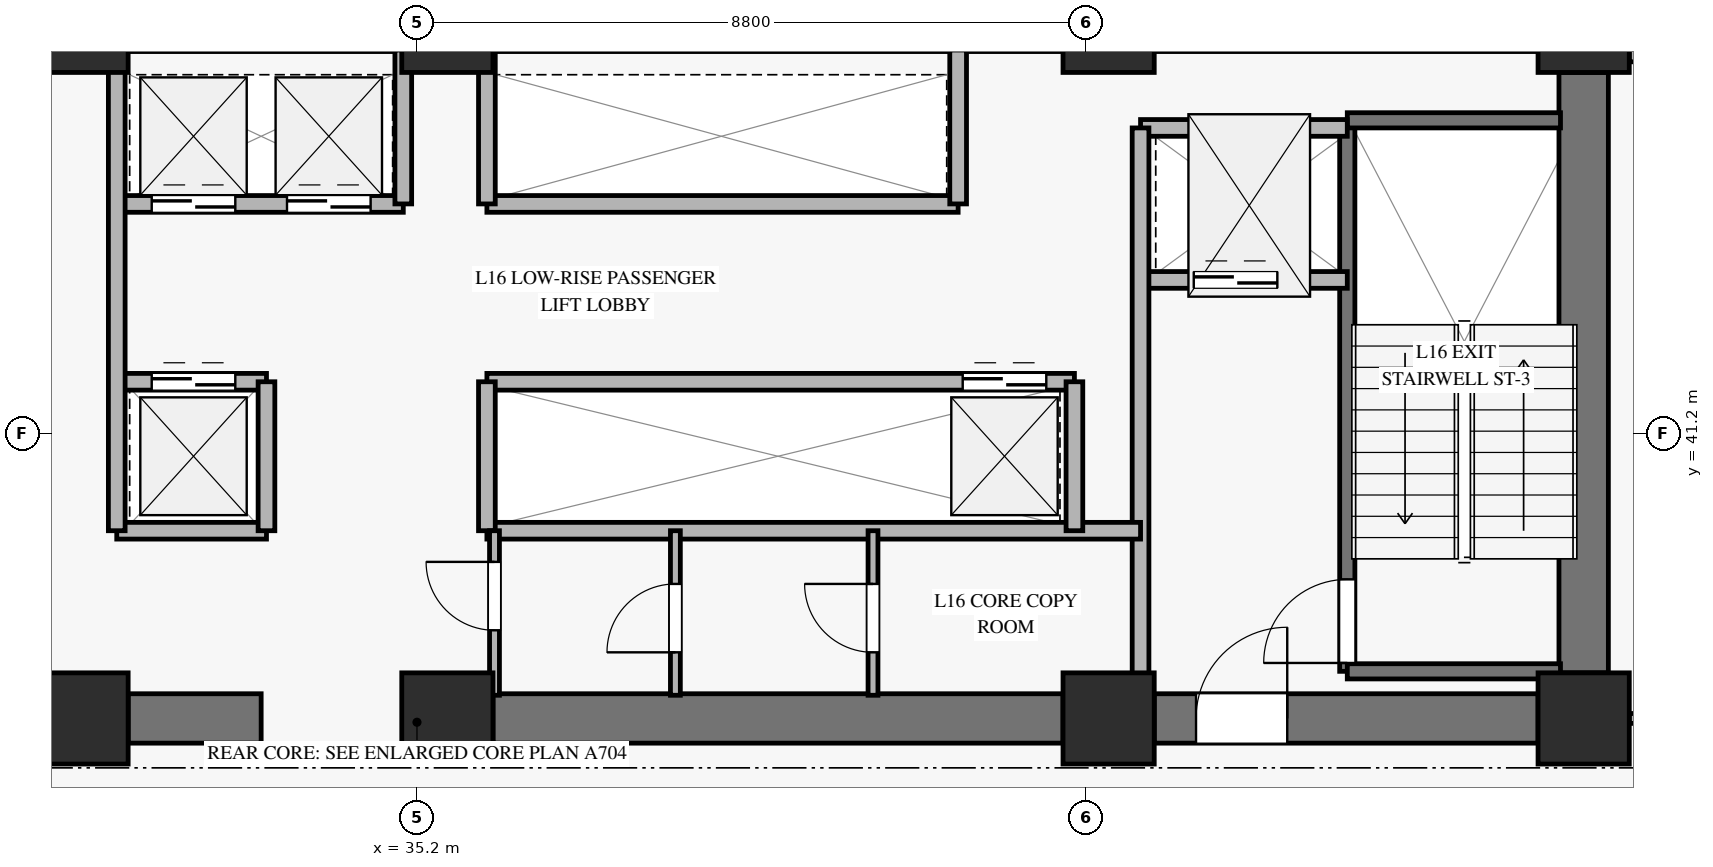
"""IFC4 building model, lengths in metres.
Left out: names, types, materials, properties, quantities, classifications, styles, units other than length and angle.
Written with IfcOpenShell. Run it as: python <this file> out.ifc"""

import sys

from ifc_helpers import new_model, si_unit, direction, frame, frame_2d, origin, origin_2d, place, context, subcontext, project, spatial, rectangle, extrude, source, transform, mapped, element, fill, save


model = new_model("IFC4")
c1 = context("Model", 3, precision=1e-05, world=origin(), true_north=direction((0.0, 1.0)))
c2 = subcontext(c1, "Body", "Model", "MODEL_VIEW")
j1 = project(units=[si_unit("LENGTHUNIT", "METRE"), si_unit("PLANEANGLEUNIT", "RADIAN")], contexts=[c1])
p1 = place(None, origin())
s1 = spatial("IfcSite", under=j1, at=p1, CompositionType="ELEMENT")
p2 = place(p1, origin())
s2 = spatial("IfcBuilding", under=s1, at=p2, CompositionType="ELEMENT")
p3 = place(p2, frame((0.0, 0.0, 65.0)))
s3 = spatial("IfcBuildingStorey", under=s2, at=p3, CompositionType="ELEMENT", Elevation=65.0)
m1 = source(origin(), c2, "Body", "SweptSolid", [
    extrude(rectangle(XDim=1.2, YDim=1.2, at=origin_2d()), origin(), (0.0, 0.0, 1.0), 3.68),
])
for number, where, z_axis, x_axis in (
    (1, (30.8, 37.45, 0.0), (0.0, 0.0, 1.0), (1.0, 0.0, 0.0)),
    (2, (30.8, 46.55, 0.0), (0.0, 0.0, 1.0), (1.0, 0.0, 0.0)),
    (3, (35.6, 37.45, 0.0), (0.0, 0.0, 1.0), (1.0, 0.0, 0.0)),
    (4, (35.6, 46.55, 0.0), (0.0, 0.0, 1.0), (1.0, 0.0, 0.0)),
    (5, (44.3, 37.45, 0.0), (0.0, 0.0, 1.0), (1.0, 0.0, 0.0)),
    (6, (44.3, 46.55, 0.0), (0.0, 0.0, 1.0), (1.0, 0.0, 0.0)),
    (7, (50.55, 37.45, 0.0), (0.0, 0.0, 1.0), (1.0, 0.0, 0.0)),
    (8, (50.55, 46.55, 0.0), (0.0, 0.0, 1.0), (1.0, 0.0, 0.0)),
):
    element("IfcColumn", number, at=place(p3, frame(where, z_axis=z_axis, x_axis=x_axis)), inside=s3, PredefinedType="PILASTER", context=c2, shape_type="MappedRepresentation", body=[
        mapped(m1, transform((0.0, 0.0, 0.0), x_axis=(1.0, 0.0, 0.0), y_axis=(0.0, 1.0, 0.0), z_axis=(0.0, 0.0, 1.0), scale=1.0)),
    ])
p4 = place(p3, frame((31.4, 37.45, 0.0), z_axis=(0.0, 0.0, 1.0), x_axis=(1.0, 0.0, 0.0)))
e9 = element("IfcWall", 9, at=p4, inside=s3, PredefinedType="SHEAR", context=c2, shape_type="SweptSolid", body=[
    extrude(rectangle(XDim=1.75, YDim=0.65, at=frame_2d((0.875, 0.0))), origin(), (0.0, 0.0, 1.0), 3.68),
])
p5 = place(p3, frame((36.2, 37.45, 0.0), z_axis=(0.0, 0.0, 1.0), x_axis=(1.0, 0.0, 0.0)))
e10 = element("IfcWall", 10, at=p5, inside=s3, PredefinedType="SHEAR", context=c2, shape_type="SweptSolid", body=[
    extrude(rectangle(XDim=7.5, YDim=0.65, at=frame_2d((3.75, 0.0))), origin(), (0.0, 0.0, 1.0), 3.68),
])
p6 = place(p3, frame((44.9, 37.45, 0.0), z_axis=(0.0, 0.0, 1.0), x_axis=(1.0, 0.0, 0.0)))
e11 = element("IfcWall", 11, at=p6, inside=s3, PredefinedType="SHEAR", context=c2, shape_type="SweptSolid", body=[
    extrude(rectangle(XDim=5.05, YDim=0.65, at=frame_2d((2.525, 0.0))), origin(), (0.0, 0.0, 1.0), 3.68),
])
p7 = place(p6, frame((0.55, 0.0, 0.0)))
e12 = element("IfcOpeningElement", 12, at=p7, cuts=e11, PredefinedType="OPENING", context=c2, shape_type="SweptSolid", body=[
    extrude(rectangle(XDim=1.2, YDim=2.15, at=frame_2d((0.6, 1.075))), frame((0.0, 0.335, 0.0), z_axis=(0.0, -1.0, 0.0), x_axis=(1.0, 0.0, 0.0)), (0.0, 0.0, 1.0), 0.67),
])
p8 = place(p3, frame((50.55, 38.05, 0.0), z_axis=(0.0, 0.0, 1.0), x_axis=(0.0, 1.0, 0.0)))
e13 = element("IfcWall", 13, at=p8, inside=s3, PredefinedType="SHEAR", context=c2, shape_type="SweptSolid", body=[
    extrude(rectangle(XDim=7.9, YDim=0.65, at=frame_2d((3.95, 0.0))), origin(), (0.0, 0.0, 1.0), 3.68),
])
p9 = place(p3, frame((51.15, 46.25, 0.0), z_axis=(0.0, 0.0, 1.0), x_axis=(1.0, 0.0, 0.0)))
e14 = element("IfcWall", 14, at=p9, inside=s3, PredefinedType="SOLIDWALL", context=c2, shape_type="SweptSolid", body=[
    extrude(rectangle(XDim=11.824, YDim=0.32, at=frame_2d((5.912, 0.0))), origin(), (0.0, 0.0, 1.0), 3.16),
])
p10 = place(p9, frame((5.112, 0.0, 0.45)))
e15 = element("IfcOpeningElement", 15, at=p10, cuts=e14, PredefinedType="OPENING", context=c2, shape_type="SweptSolid", body=[
    extrude(rectangle(XDim=1.6, YDim=2.0, at=frame_2d((0.8, 1.0))), frame((0.0, 0.17, 0.0), z_axis=(0.0, -1.0, 0.0), x_axis=(1.0, 0.0, 0.0)), (0.0, 0.0, 1.0), 0.34),
])
p11 = place(p3, frame((47.44, 38.07, 0.0), z_axis=(0.0, 0.0, 1.0), x_axis=(0.0, 1.0, 0.0)))
e16 = element("IfcWall", 16, at=p11, inside=s3, PredefinedType="SOLIDWALL", context=c2, shape_type="SweptSolid", body=[
    extrude(rectangle(XDim=7.25, YDim=0.2, at=frame_2d((3.625, 0.0))), origin(), (0.0, 0.0, 1.0), 3.9),
])
p12 = place(p11, frame((0.11, 0.0, 0.0)))
e17 = element("IfcOpeningElement", 17, at=p12, cuts=e16, PredefinedType="OPENING", context=c2, shape_type="SweptSolid", body=[
    extrude(rectangle(XDim=1.1, YDim=2.15, at=frame_2d((0.55, 1.075))), frame((0.0, 0.11, 0.0), z_axis=(0.0, -1.0, 0.0), x_axis=(1.0, 0.0, 0.0)), (0.0, 0.0, 1.0), 0.22),
])
for number, where, z_axis, x_axis in (
    (18, (47.44, 45.32, 0.0), (0.0, 0.0, 1.0), (1.0, 0.0, 0.0)),
    (19, (47.44, 38.07, 0.0), (0.0, 0.0, 1.0), (1.0, 0.0, 0.0)),
):
    element("IfcWall", number, at=place(p3, frame(where, z_axis=z_axis, x_axis=x_axis)), inside=s3, PredefinedType="SOLIDWALL", context=c2, shape_type="SweptSolid", body=[
        extrude(rectangle(XDim=2.805, YDim=0.2, at=frame_2d((1.403, 0.0))), origin(), (0.0, 0.0, 1.0), 3.9),
    ])
p13 = place(p3, frame((44.72, 43.22, 0.0), z_axis=(0.0, 0.0, 1.0), x_axis=(1.0, 0.0, 0.0)))
e20 = element("IfcWall", 20, at=p13, inside=s3, PredefinedType="SOLIDWALL", context=c2, shape_type="SweptSolid", body=[
    extrude(rectangle(XDim=2.72, YDim=0.22, at=frame_2d((1.36, 0.0))), origin(), (0.0, 0.0, 1.0), 3.68),
])
p14 = place(p13, frame((0.7, 0.0, 0.0)))
e21 = element("IfcOpeningElement", 21, at=p14, cuts=e20, PredefinedType="OPENING", context=c2, shape_type="SweptSolid", body=[
    extrude(rectangle(XDim=1.1, YDim=2.2, at=frame_2d((0.55, 1.1))), frame((0.0, 0.12, 0.0), z_axis=(0.0, -1.0, 0.0), x_axis=(1.0, 0.0, 0.0)), (0.0, 0.0, 1.0), 0.24),
])
p15 = place(p3, frame((44.72, 45.22, 0.0), z_axis=(0.0, 0.0, 1.0), x_axis=(1.0, 0.0, 0.0)))
e22 = element("IfcWall", 22, at=p15, inside=s3, PredefinedType="SOLIDWALL", context=c2, shape_type="SweptSolid", body=[
    extrude(rectangle(XDim=2.72, YDim=0.22, at=frame_2d((1.36, 0.0))), origin(), (0.0, 0.0, 1.0), 3.68),
])
p16 = place(p3, frame((44.72, 37.755, 0.0), z_axis=(0.0, 0.0, 1.0), x_axis=(0.0, 1.0, 0.0)))
e23 = element("IfcWall", 23, at=p16, inside=s3, PredefinedType="SOLIDWALL", context=c2, shape_type="SweptSolid", body=[
    extrude(rectangle(XDim=7.465, YDim=0.22, at=frame_2d((3.732, 0.0))), origin(), (0.0, 0.0, 1.0), 3.68),
])
p17 = place(p3, frame((31.25, 44.22, 0.0), z_axis=(0.0, 0.0, 1.0), x_axis=(1.0, 0.0, 0.0)))
e24 = element("IfcWall", 24, at=p17, inside=s3, PredefinedType="SOLIDWALL", context=c2, shape_type="SweptSolid", body=[
    extrude(rectangle(XDim=3.77, YDim=0.22, at=frame_2d((1.885, 0.0))), origin(), (0.0, 0.0, 1.0), 3.68),
])
p18 = place(p17, frame((0.46, 0.0, 0.0)))
e25 = element("IfcOpeningElement", 25, at=p18, cuts=e24, PredefinedType="OPENING", context=c2, shape_type="SweptSolid", body=[
    extrude(rectangle(XDim=1.1, YDim=2.2, at=frame_2d((0.55, 1.1))), frame((0.0, 0.12, 0.0), z_axis=(0.0, -1.0, 0.0), x_axis=(1.0, 0.0, 0.0)), (0.0, 0.0, 1.0), 0.24),
])
p19 = place(p17, frame((2.24, 0.0, 0.0)))
e26 = element("IfcOpeningElement", 26, at=p19, cuts=e24, PredefinedType="OPENING", context=c2, shape_type="SweptSolid", body=[
    extrude(rectangle(XDim=1.1, YDim=2.2, at=frame_2d((0.55, 1.1))), frame((0.0, 0.12, 0.0), z_axis=(0.0, -1.0, 0.0), x_axis=(1.0, 0.0, 0.0)), (0.0, 0.0, 1.0), 0.24),
])
p20 = place(p3, frame((36.12, 44.22, 0.0), z_axis=(0.0, 0.0, 1.0), x_axis=(1.0, 0.0, 0.0)))
e27 = element("IfcWall", 27, at=p20, inside=s3, PredefinedType="SOLIDWALL", context=c2, shape_type="SweptSolid", body=[
    extrude(rectangle(XDim=6.2, YDim=0.22, at=frame_2d((3.1, 0.0))), origin(), (0.0, 0.0, 1.0), 3.68),
])
for number, where, z_axis, x_axis in (
    (28, (35.02, 44.22, 0.0), (0.0, 0.0, 1.0), (0.0, 1.0, 0.0)),
    (29, (36.12, 44.22, 0.0), (0.0, 0.0, 1.0), (0.0, 1.0, 0.0)),
    (30, (42.32, 44.22, 0.0), (0.0, 0.0, 1.0), (0.0, 1.0, 0.0)),
):
    element("IfcWall", number, at=place(p3, frame(where, z_axis=z_axis, x_axis=x_axis)), inside=s3, PredefinedType="SOLIDWALL", context=c2, shape_type="SweptSolid", body=[
        extrude(rectangle(XDim=2.025, YDim=0.22, at=frame_2d((1.013, 0.0))), origin(), (0.0, 0.0, 1.0), 3.68),
    ])
p21 = place(p3, frame((31.25, 41.88, 0.0), z_axis=(0.0, 0.0, 1.0), x_axis=(1.0, 0.0, 0.0)))
e31 = element("IfcWall", 31, at=p21, inside=s3, PredefinedType="SOLIDWALL", context=c2, shape_type="SweptSolid", body=[
    extrude(rectangle(XDim=1.97, YDim=0.22, at=frame_2d((0.985, 0.0))), origin(), (0.0, 0.0, 1.0), 3.68),
])
p22 = place(p21, frame((0.46, 0.0, 0.0)))
e32 = element("IfcOpeningElement", 32, at=p22, cuts=e31, PredefinedType="OPENING", context=c2, shape_type="SweptSolid", body=[
    extrude(rectangle(XDim=1.1, YDim=2.2, at=frame_2d((0.55, 1.1))), frame((0.0, 0.12, 0.0), z_axis=(0.0, -1.0, 0.0), x_axis=(1.0, 0.0, 0.0)), (0.0, 0.0, 1.0), 0.24),
])
p23 = place(p3, frame((36.12, 41.88, 0.0), z_axis=(0.0, 0.0, 1.0), x_axis=(1.0, 0.0, 0.0)))
e33 = element("IfcWall", 33, at=p23, inside=s3, PredefinedType="SOLIDWALL", context=c2, shape_type="SweptSolid", body=[
    extrude(rectangle(XDim=7.73, YDim=0.22, at=frame_2d((3.865, 0.0))), origin(), (0.0, 0.0, 1.0), 3.68),
])
p24 = place(p23, frame((6.26, 0.0, 0.0)))
e34 = element("IfcOpeningElement", 34, at=p24, cuts=e33, PredefinedType="OPENING", context=c2, shape_type="SweptSolid", body=[
    extrude(rectangle(XDim=1.1, YDim=2.2, at=frame_2d((0.55, 1.1))), frame((0.0, 0.12, 0.0), z_axis=(0.0, -1.0, 0.0), x_axis=(1.0, 0.0, 0.0)), (0.0, 0.0, 1.0), 0.24),
])
p25 = place(p3, frame((31.25, 39.92, 0.0), z_axis=(0.0, 0.0, 1.0), x_axis=(1.0, 0.0, 0.0)))
e35 = element("IfcWall", 35, at=p25, inside=s3, PredefinedType="SOLIDWALL", context=c2, shape_type="SweptSolid", body=[
    extrude(rectangle(XDim=1.97, YDim=0.22, at=frame_2d((0.985, 0.0))), origin(), (0.0, 0.0, 1.0), 3.68),
])
p26 = place(p3, frame((33.22, 39.92, 0.0), z_axis=(0.0, 0.0, 1.0), x_axis=(0.0, 1.0, 0.0)))
e36 = element("IfcWall", 36, at=p26, inside=s3, PredefinedType="SOLIDWALL", context=c2, shape_type="SweptSolid", body=[
    extrude(rectangle(XDim=1.96, YDim=0.22, at=frame_2d((0.98, 0.0))), origin(), (0.0, 0.0, 1.0), 3.68),
])
p27 = place(p3, frame((36.12, 39.92, 0.0), z_axis=(0.0, 0.0, 1.0), x_axis=(1.0, 0.0, 0.0)))
e37 = element("IfcWall", 37, at=p27, inside=s3, PredefinedType="SOLIDWALL", context=c2, shape_type="SweptSolid", body=[
    extrude(rectangle(XDim=8.6, YDim=0.22, at=frame_2d((4.3, 0.0))), origin(), (0.0, 0.0, 1.0), 2.965),
])
p28 = place(p3, frame((36.12, 39.92, 0.0), z_axis=(0.0, 0.0, 1.0), x_axis=(0.0, 1.0, 0.0)))
e38 = element("IfcWall", 38, at=p28, inside=s3, PredefinedType="SOLIDWALL", context=c2, shape_type="SweptSolid", body=[
    extrude(rectangle(XDim=1.96, YDim=0.22, at=frame_2d((0.98, 0.0))), origin(), (0.0, 0.0, 1.0), 3.68),
])
p29 = place(p3, frame((31.25, 39.92, 0.0), z_axis=(0.0, 0.0, 1.0), x_axis=(0.0, 1.0, 0.0)))
e39 = element("IfcWall", 39, at=p29, inside=s3, PredefinedType="SOLIDWALL", context=c2, shape_type="SweptSolid", body=[
    extrude(rectangle(XDim=6.325, YDim=0.22, at=frame_2d((3.163, 0.0))), origin(), (0.0, 0.0, 1.0), 3.68),
])
p30 = place(p3, frame((43.85, 39.92, 0.0), z_axis=(0.0, 0.0, 1.0), x_axis=(0.0, 1.0, 0.0)))
e40 = element("IfcWall", 40, at=p30, inside=s3, PredefinedType="SOLIDWALL", context=c2, shape_type="SweptSolid", body=[
    extrude(rectangle(XDim=1.96, YDim=0.22, at=frame_2d((0.98, 0.0))), origin(), (0.0, 0.0, 1.0), 3.68),
])
p31 = place(p3, frame((36.22, 37.755, 0.0), z_axis=(0.0, 0.0, 1.0), x_axis=(0.0, 1.0, 0.0)))
e41 = element("IfcWall", 41, at=p31, inside=s3, PredefinedType="PARTITIONING", context=c2, shape_type="SweptSolid", body=[
    extrude(rectangle(XDim=2.165, YDim=0.13, at=frame_2d((1.083, 0.0))), origin(), (0.0, 0.0, 1.0), 3.68),
])
p32 = place(p31, frame((0.855, 0.0, 0.0)))
e42 = element("IfcOpeningElement", 42, at=p32, cuts=e41, PredefinedType="OPENING", context=c2, shape_type="SweptSolid", body=[
    extrude(rectangle(XDim=0.9, YDim=2.1, at=frame_2d((0.45, 1.05))), frame((0.0, 0.075, 0.0), z_axis=(0.0, -1.0, 0.0), x_axis=(1.0, 0.0, 0.0)), (0.0, 0.0, 1.0), 0.15),
])
p33 = place(p3, frame((38.6, 37.755, 0.0), z_axis=(0.0, 0.0, 1.0), x_axis=(0.0, 1.0, 0.0)))
e43 = element("IfcWall", 43, at=p33, inside=s3, PredefinedType="PARTITIONING", context=c2, shape_type="SweptSolid", body=[
    extrude(rectangle(XDim=2.165, YDim=0.13, at=frame_2d((1.083, 0.0))), origin(), (0.0, 0.0, 1.0), 3.68),
])
p34 = place(p33, frame((0.565, 0.0, 0.0)))
e44 = element("IfcOpeningElement", 44, at=p34, cuts=e43, PredefinedType="OPENING", context=c2, shape_type="SweptSolid", body=[
    extrude(rectangle(XDim=0.9, YDim=2.1, at=frame_2d((0.45, 1.05))), frame((0.0, 0.075, 0.0), z_axis=(0.0, -1.0, 0.0), x_axis=(1.0, 0.0, 0.0)), (0.0, 0.0, 1.0), 0.15),
])
p35 = place(p3, frame((41.2, 37.755, 0.0), z_axis=(0.0, 0.0, 1.0), x_axis=(0.0, 1.0, 0.0)))
e45 = element("IfcWall", 45, at=p35, inside=s3, PredefinedType="PARTITIONING", context=c2, shape_type="SweptSolid", body=[
    extrude(rectangle(XDim=2.165, YDim=0.13, at=frame_2d((1.083, 0.0))), origin(), (0.0, 0.0, 1.0), 3.68),
])
p36 = place(p35, frame((0.565, 0.0, 0.0)))
e46 = element("IfcOpeningElement", 46, at=p36, cuts=e45, PredefinedType="OPENING", context=c2, shape_type="SweptSolid", body=[
    extrude(rectangle(XDim=0.9, YDim=2.1, at=frame_2d((0.45, 1.05))), frame((0.0, 0.075, 0.0), z_axis=(0.0, -1.0, 0.0), x_axis=(1.0, 0.0, 0.0)), (0.0, 0.0, 1.0), 0.15),
])
p37 = place(p3, frame((51.15, 37.45, 0.0), z_axis=(0.0, 0.0, 1.0), x_axis=(1.0, 0.0, 0.0)))
e47 = element("IfcWall", 47, at=p37, inside=s3, PredefinedType="PARTITIONING", context=c2, shape_type="SweptSolid", body=[
    extrude(rectangle(XDim=15.446, YDim=0.13, at=frame_2d((7.723, 0.0))), origin(), (0.0, 0.0, 1.0), 3.165),
])
p38 = place(p37, frame((0.5, 0.0, 0.0)))
e48 = element("IfcOpeningElement", 48, at=p38, cuts=e47, PredefinedType="OPENING", context=c2, shape_type="SweptSolid", body=[
    extrude(rectangle(XDim=0.9, YDim=2.1, at=frame_2d((0.45, 1.05))), frame((0.0, 0.075, 0.0), z_axis=(0.0, -1.0, 0.0), x_axis=(1.0, 0.0, 0.0)), (0.0, 0.0, 1.0), 0.15),
])
p39 = place(p37, frame((11.252, 0.0, 0.0)))
e49 = element("IfcOpeningElement", 49, at=p39, cuts=e47, PredefinedType="OPENING", context=c2, shape_type="SweptSolid", body=[
    extrude(rectangle(XDim=0.95, YDim=2.1, at=frame_2d((0.475, 1.05))), frame((0.0, 0.075, 0.0), z_axis=(0.0, -1.0, 0.0), x_axis=(1.0, 0.0, 0.0)), (0.0, 0.0, 1.0), 0.15),
])
m2 = source(origin(), c2, "Body", "SweptSolid", [
    extrude(rectangle(XDim=1.1, YDim=2.15, at=frame_2d((0.55, 1.075))), frame((0.0, 0.025, 0.0), z_axis=(0.0, -1.0, 0.0), x_axis=(1.0, 0.0, 0.0)), (0.0, 0.0, 1.0), 0.05),
])
p40 = place(p12, origin())
e50 = element("IfcDoor", 50, at=p40, inside=s3, OperationType="SINGLE_SWING_LEFT", PredefinedType="DOOR", context=c2, shape_type="MappedRepresentation", body=[
    mapped(m2, transform((0.0, 0.0, 0.0), x_axis=(1.0, 0.0, 0.0), y_axis=(0.0, 1.0, 0.0), z_axis=(0.0, 0.0, 1.0), scale=1.0)),
])
fill(e17, e50)
m3 = source(origin(), c2, "Body", "SweptSolid", [
    extrude(rectangle(XDim=1.1, YDim=2.2, at=frame_2d((0.55, 1.1))), frame((0.0, 0.025, 0.0), z_axis=(0.0, -1.0, 0.0), x_axis=(1.0, 0.0, 0.0)), (0.0, 0.0, 1.0), 0.05),
])
p41 = place(p14, origin())
e51 = element("IfcDoor", 51, at=p41, inside=s3, OperationType="SLIDING_TO_LEFT", PredefinedType="DOOR", context=c2, shape_type="MappedRepresentation", body=[
    mapped(m3, transform((0.0, 0.0, 0.0), x_axis=(1.0, 0.0, 0.0), y_axis=(0.0, 1.0, 0.0), z_axis=(0.0, 0.0, 1.0), scale=1.0)),
])
fill(e21, e51)
m4 = source(origin(), c2, "Body", "SweptSolid", [
    extrude(rectangle(XDim=1.2, YDim=2.15, at=frame_2d((0.6, 1.075))), frame((0.0, 0.025, 0.0), z_axis=(0.0, -1.0, 0.0), x_axis=(1.0, 0.0, 0.0)), (0.0, 0.0, 1.0), 0.05),
])
p42 = place(p7, origin())
e52 = element("IfcDoor", 52, at=p42, inside=s3, OperationType="SINGLE_SWING_RIGHT", PredefinedType="DOOR", context=c2, shape_type="MappedRepresentation", body=[
    mapped(m4, transform((0.0, 0.0, 0.0), x_axis=(1.0, 0.0, 0.0), y_axis=(0.0, 1.0, 0.0), z_axis=(0.0, 0.0, 1.0), scale=1.0)),
])
fill(e12, e52)
p43 = place(p18, origin())
e53 = element("IfcDoor", 53, at=p43, inside=s3, OperationType="SLIDING_TO_LEFT", PredefinedType="DOOR", context=c2, shape_type="MappedRepresentation", body=[
    mapped(m3, transform((0.0, 0.0, 0.0), x_axis=(1.0, 0.0, 0.0), y_axis=(0.0, 1.0, 0.0), z_axis=(0.0, 0.0, 1.0), scale=1.0)),
])
fill(e25, e53)
p44 = place(p19, origin())
e54 = element("IfcDoor", 54, at=p44, inside=s3, OperationType="SLIDING_TO_LEFT", PredefinedType="DOOR", context=c2, shape_type="MappedRepresentation", body=[
    mapped(m3, transform((0.0, 0.0, 0.0), x_axis=(1.0, 0.0, 0.0), y_axis=(0.0, 1.0, 0.0), z_axis=(0.0, 0.0, 1.0), scale=1.0)),
])
fill(e26, e54)
p45 = place(p22, origin())
e55 = element("IfcDoor", 55, at=p45, inside=s3, OperationType="SLIDING_TO_LEFT", PredefinedType="DOOR", context=c2, shape_type="MappedRepresentation", body=[
    mapped(m3, transform((0.0, 0.0, 0.0), x_axis=(1.0, 0.0, 0.0), y_axis=(0.0, 1.0, 0.0), z_axis=(0.0, 0.0, 1.0), scale=1.0)),
])
fill(e32, e55)
p46 = place(p24, origin())
e56 = element("IfcDoor", 56, at=p46, inside=s3, OperationType="SLIDING_TO_LEFT", PredefinedType="DOOR", context=c2, shape_type="MappedRepresentation", body=[
    mapped(m3, transform((0.0, 0.0, 0.0), x_axis=(1.0, 0.0, 0.0), y_axis=(0.0, 1.0, 0.0), z_axis=(0.0, 0.0, 1.0), scale=1.0)),
])
fill(e34, e56)
m5 = source(origin(), c2, "Body", "SweptSolid", [
    extrude(rectangle(XDim=0.9, YDim=2.1, at=frame_2d((0.45, 1.05))), frame((0.0, 0.025, 0.0), z_axis=(0.0, -1.0, 0.0), x_axis=(1.0, 0.0, 0.0)), (0.0, 0.0, 1.0), 0.05),
])
p47 = place(p32, origin())
e57 = element("IfcDoor", 57, at=p47, inside=s3, OperationType="SINGLE_SWING_RIGHT", PredefinedType="DOOR", context=c2, shape_type="MappedRepresentation", body=[
    mapped(m5, transform((0.0, 0.0, 0.0), x_axis=(1.0, 0.0, 0.0), y_axis=(0.0, 1.0, 0.0), z_axis=(0.0, 0.0, 1.0), scale=1.0)),
])
fill(e42, e57)
p48 = place(p34, origin())
e58 = element("IfcDoor", 58, at=p48, inside=s3, OperationType="SINGLE_SWING_LEFT", PredefinedType="DOOR", context=c2, shape_type="MappedRepresentation", body=[
    mapped(m5, transform((0.0, 0.0, 0.0), x_axis=(1.0, 0.0, 0.0), y_axis=(0.0, 1.0, 0.0), z_axis=(0.0, 0.0, 1.0), scale=1.0)),
])
fill(e44, e58)
p49 = place(p36, origin())
e59 = element("IfcDoor", 59, at=p49, inside=s3, OperationType="SINGLE_SWING_RIGHT", PredefinedType="DOOR", context=c2, shape_type="MappedRepresentation", body=[
    mapped(m5, transform((0.0, 0.0, 0.0), x_axis=(1.0, 0.0, 0.0), y_axis=(0.0, 1.0, 0.0), z_axis=(0.0, 0.0, 1.0), scale=1.0)),
])
fill(e46, e59)
save(model, sys.argv[1])
